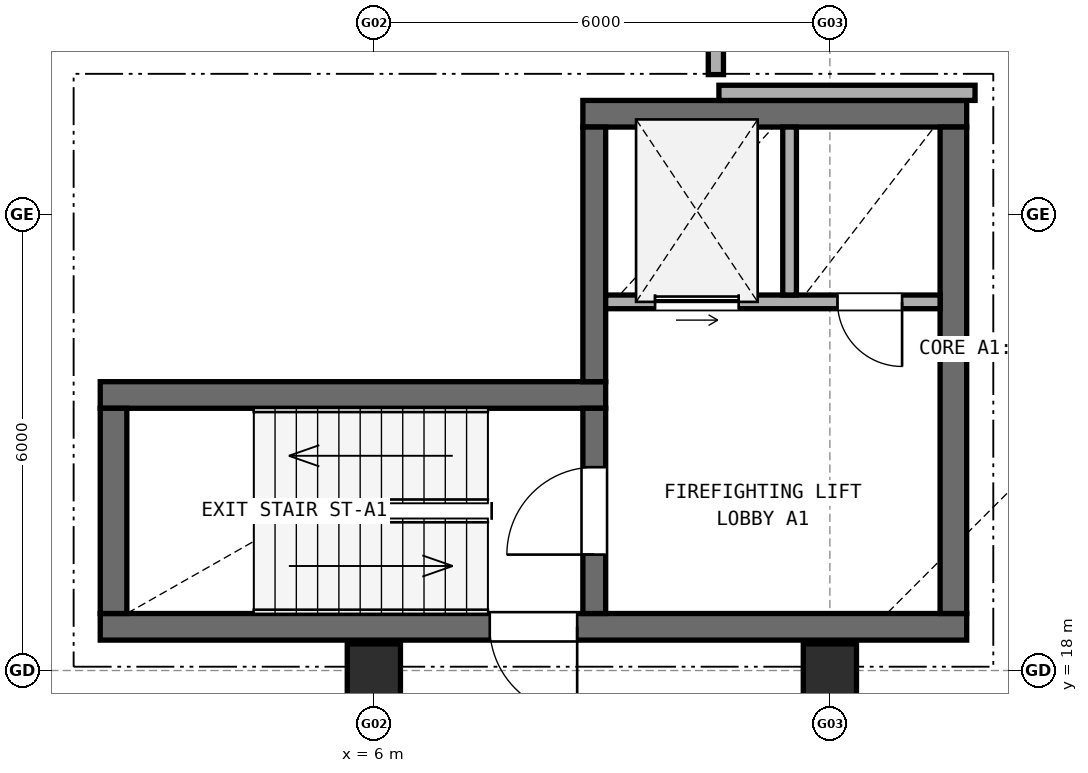
"""IFC4 building model, lengths in metres.
Left out: names, types, materials, properties, quantities, classifications, styles, units other than length and angle.
Written with IfcOpenShell. Run it as: python <this file> out.ifc"""

import sys

from ifc_helpers import new_model, si_unit, direction, frame, frame_2d, origin, origin_2d, place, context, subcontext, project, spatial, rectangle, extrude, element, fill, save


model = new_model("IFC4")
c1 = context("Model", 3, precision=1e-05, world=origin(), true_north=direction((0.0, 1.0)))
c2 = subcontext(c1, "Body", "Model", "MODEL_VIEW")
j1 = project(units=[si_unit("LENGTHUNIT", "METRE"), si_unit("PLANEANGLEUNIT", "RADIAN")], contexts=[c1])
p1 = place(None, origin())
s1 = spatial("IfcSite", under=j1, at=p1, CompositionType="ELEMENT")
p2 = place(p1, origin())
s2 = spatial("IfcBuilding", under=s1, at=p2, CompositionType="ELEMENT")
p3 = place(p2, origin())
s3 = spatial("IfcBuildingStorey", under=s2, at=p3, CompositionType="ELEMENT", Elevation=0.0)
for number, where, z_axis, x_axis in (
    (1, (6.0, 18.0, 0.0), (0.0, 0.0, 1.0), (1.0, 0.0, 0.0)),
    (2, (12.0, 18.0, 0.0), (0.0, 0.0, 1.0), (1.0, 0.0, 0.0)),
):
    element("IfcColumn", number, at=place(p3, frame(where, z_axis=z_axis, x_axis=x_axis)), inside=s3, PredefinedType="COLUMN", context=c2, shape_type="SweptSolid", body=[
        extrude(rectangle(XDim=0.7, YDim=0.7, at=origin_2d()), origin(), (0.0, 0.0, 1.0), 4.23),
    ])
p4 = place(p3, frame((2.4, 18.575, 0.0), z_axis=(0.0, 0.0, 1.0), x_axis=(1.0, 0.0, 0.0)))
e3 = element("IfcWall", 3, at=p4, inside=s3, PredefinedType="SHEAR", context=c2, shape_type="SweptSolid", body=[
    extrude(rectangle(XDim=11.4, YDim=0.35, at=frame_2d((5.7, 0.0))), origin(), (0.0, 0.0, 1.0), 4.23),
])
p5 = place(p4, frame((5.125, 0.0, 0.0)))
e4 = element("IfcOpeningElement", 4, at=p5, cuts=e3, PredefinedType="OPENING", context=c2, shape_type="SweptSolid", body=[
    extrude(rectangle(XDim=1.15, YDim=2.15, at=frame_2d((0.575, 1.075))), frame((0.0, 0.185, 0.0), z_axis=(0.0, -1.0, 0.0), x_axis=(1.0, 0.0, 0.0)), (0.0, 0.0, 1.0), 0.37),
])
p6 = place(p3, frame((9.05, 21.625, 0.0), z_axis=(0.0, 0.0, 1.0), x_axis=(-1.0, 0.0, 0.0)))
e5 = element("IfcWall", 5, at=p6, inside=s3, PredefinedType="SHEAR", context=c2, shape_type="SweptSolid", body=[
    extrude(rectangle(XDim=6.65, YDim=0.35, at=frame_2d((3.325, 0.0))), origin(), (0.0, 0.0, 1.0), 4.23),
])
p7 = place(p3, frame((2.575, 21.45, 0.0), z_axis=(0.0, 0.0, 1.0), x_axis=(0.0, -1.0, 0.0)))
e6 = element("IfcWall", 6, at=p7, inside=s3, PredefinedType="SHEAR", context=c2, shape_type="SweptSolid", body=[
    extrude(rectangle(XDim=2.7, YDim=0.35, at=frame_2d((1.35, 0.0))), origin(), (0.0, 0.0, 1.0), 4.23),
])
p8 = place(p3, frame((8.9, 18.75, 0.0), z_axis=(0.0, 0.0, 1.0), x_axis=(0.0, 1.0, 0.0)))
e7 = element("IfcWall", 7, at=p8, inside=s3, PredefinedType="SHEAR", context=c2, shape_type="SweptSolid", body=[
    extrude(rectangle(XDim=2.7, YDim=0.3, at=frame_2d((1.35, 0.0))), origin(), (0.0, 0.0, 1.0), 4.23),
])
p9 = place(p8, frame((0.775, 0.0, 0.0)))
e8 = element("IfcOpeningElement", 8, at=p9, cuts=e7, PredefinedType="OPENING", context=c2, shape_type="SweptSolid", body=[
    extrude(rectangle(XDim=1.15, YDim=2.15, at=frame_2d((0.575, 1.075))), frame((0.0, 0.16, 0.0), z_axis=(0.0, -1.0, 0.0), x_axis=(1.0, 0.0, 0.0)), (0.0, 0.0, 1.0), 0.32),
])
p10 = place(p3, frame((13.8, 25.325, 0.0), z_axis=(0.0, 0.0, 1.0), x_axis=(-1.0, 0.0, 0.0)))
e9 = element("IfcWall", 9, at=p10, inside=s3, PredefinedType="SHEAR", context=c2, shape_type="SweptSolid", body=[
    extrude(rectangle(XDim=5.05, YDim=0.35, at=frame_2d((2.525, 0.0))), origin(), (0.0, 0.0, 1.0), 4.23),
])
p11 = place(p3, frame((13.625, 18.75, 0.0), z_axis=(0.0, 0.0, 1.0), x_axis=(0.0, 1.0, 0.0)))
e10 = element("IfcWall", 10, at=p11, inside=s3, PredefinedType="SHEAR", context=c2, shape_type="SweptSolid", body=[
    extrude(rectangle(XDim=6.4, YDim=0.35, at=frame_2d((3.2, 0.0))), origin(), (0.0, 0.0, 1.0), 4.23),
])
p12 = place(p3, frame((8.9, 21.8, 0.0), z_axis=(0.0, 0.0, 1.0), x_axis=(0.0, 1.0, 0.0)))
e11 = element("IfcWall", 11, at=p12, inside=s3, PredefinedType="SHEAR", context=c2, shape_type="SweptSolid", body=[
    extrude(rectangle(XDim=3.35, YDim=0.3, at=frame_2d((1.675, 0.0))), origin(), (0.0, 0.0, 1.0), 4.23),
])
p13 = place(p3, frame((9.05, 22.85, 0.0), z_axis=(0.0, 0.0, 1.0), x_axis=(1.0, 0.0, 0.0)))
e12 = element("IfcWall", 12, at=p13, inside=s3, PredefinedType="SOLIDWALL", context=c2, shape_type="SweptSolid", body=[
    extrude(rectangle(XDim=4.4, YDim=0.18, at=frame_2d((2.2, 0.0))), origin(), (0.0, 0.0, 1.0), 4.23),
])
p14 = place(p13, frame((0.65, 0.0, 0.0)))
e13 = element("IfcOpeningElement", 13, at=p14, cuts=e12, PredefinedType="OPENING", context=c2, shape_type="SweptSolid", body=[
    extrude(rectangle(XDim=1.1, YDim=2.15, at=frame_2d((0.55, 1.075))), frame((0.0, 0.1, 0.0), z_axis=(0.0, -1.0, 0.0), x_axis=(1.0, 0.0, 0.0)), (0.0, 0.0, 1.0), 0.2),
])
p15 = place(p13, frame((3.05, 0.0, 0.0)))
e14 = element("IfcOpeningElement", 14, at=p15, cuts=e12, PredefinedType="OPENING", context=c2, shape_type="SweptSolid", body=[
    extrude(rectangle(XDim=0.85, YDim=2.1, at=frame_2d((0.425, 1.05))), frame((0.0, 0.1, 0.0), z_axis=(0.0, -1.0, 0.0), x_axis=(1.0, 0.0, 0.0)), (0.0, 0.0, 1.0), 0.2),
])
p16 = place(p3, frame((11.47, 22.94, 0.0), z_axis=(0.0, 0.0, 1.0), x_axis=(0.0, 1.0, 0.0)))
e15 = element("IfcWall", 15, at=p16, inside=s3, PredefinedType="SOLIDWALL", context=c2, shape_type="SweptSolid", body=[
    extrude(rectangle(XDim=2.21, YDim=0.18, at=frame_2d((1.105, 0.0))), origin(), (0.0, 0.0, 1.0), 4.23),
])
p17 = place(p3, frame((10.54, 25.6, 0.0), z_axis=(0.0, 0.0, 1.0), x_axis=(1.0, 0.0, 0.0)))
e16 = element("IfcWall", 16, at=p17, inside=s3, PredefinedType="SOLIDWALL", context=c2, shape_type="SweptSolid", body=[
    extrude(rectangle(XDim=3.37, YDim=0.2, at=frame_2d((1.685, 0.0))), origin(), (0.0, 0.0, 1.0), 2.912),
])
p18 = place(p3, frame((10.5, 25.84, 0.0), z_axis=(0.0, 0.0, 1.0), x_axis=(0.0, 1.0, 0.0)))
e17 = element("IfcWall", 17, at=p18, inside=s3, PredefinedType="SOLIDWALL", context=c2, shape_type="SweptSolid", body=[
    extrude(rectangle(XDim=15.72, YDim=0.2, at=frame_2d((7.86, 0.0))), origin(), (0.0, 0.0, 1.0), 3.112),
])
p19 = place(p18, frame((7.36, 0.0, 0.0)))
e18 = element("IfcOpeningElement", 18, at=p19, cuts=e17, PredefinedType="OPENING", context=c2, shape_type="SweptSolid", body=[
    extrude(rectangle(XDim=1.0, YDim=2.15, at=frame_2d((0.5, 1.075))), frame((0.0, 0.11, 0.0), z_axis=(0.0, -1.0, 0.0), x_axis=(1.0, 0.0, 0.0)), (0.0, 0.0, 1.0), 0.22),
])
p20 = place(p5, origin())
e19 = element("IfcDoor", 19, at=p20, inside=s3, OperationType="SINGLE_SWING_RIGHT", PredefinedType="DOOR", context=c2, shape_type="SweptSolid", body=[
    extrude(rectangle(XDim=1.15, YDim=2.15, at=frame_2d((0.575, 1.075))), frame((0.0, 0.025, 0.0), z_axis=(0.0, -1.0, 0.0), x_axis=(1.0, 0.0, 0.0)), (0.0, 0.0, 1.0), 0.05),
])
fill(e4, e19)
p21 = place(p9, origin())
e20 = element("IfcDoor", 20, at=p21, inside=s3, OperationType="SINGLE_SWING_LEFT", PredefinedType="DOOR", context=c2, shape_type="SweptSolid", body=[
    extrude(rectangle(XDim=1.15, YDim=2.15, at=frame_2d((0.575, 1.075))), frame((0.0, 0.025, 0.0), z_axis=(0.0, -1.0, 0.0), x_axis=(1.0, 0.0, 0.0)), (0.0, 0.0, 1.0), 0.05),
])
fill(e8, e20)
p22 = place(p14, origin())
e21 = element("IfcDoor", 21, at=p22, inside=s3, OperationType="SLIDING_TO_LEFT", PredefinedType="DOOR", context=c2, shape_type="SweptSolid", body=[
    extrude(rectangle(XDim=1.1, YDim=2.15, at=frame_2d((0.55, 1.075))), frame((0.0, 0.025, 0.0), z_axis=(0.0, -1.0, 0.0), x_axis=(1.0, 0.0, 0.0)), (0.0, 0.0, 1.0), 0.05),
])
fill(e13, e21)
p23 = place(p15, frame((0.85, 0.0, 0.0), z_axis=(0.0, 0.0, 1.0), x_axis=(-1.0, 0.0, 0.0)))
e22 = element("IfcDoor", 22, at=p23, inside=s3, OperationType="SINGLE_SWING_RIGHT", PredefinedType="DOOR", context=c2, shape_type="SweptSolid", body=[
    extrude(rectangle(XDim=0.85, YDim=2.1, at=frame_2d((0.425, 1.05))), frame((0.0, 0.025, 0.0), z_axis=(0.0, -1.0, 0.0), x_axis=(1.0, 0.0, 0.0)), (0.0, 0.0, 1.0), 0.05),
])
fill(e14, e22)
save(model, sys.argv[1])
